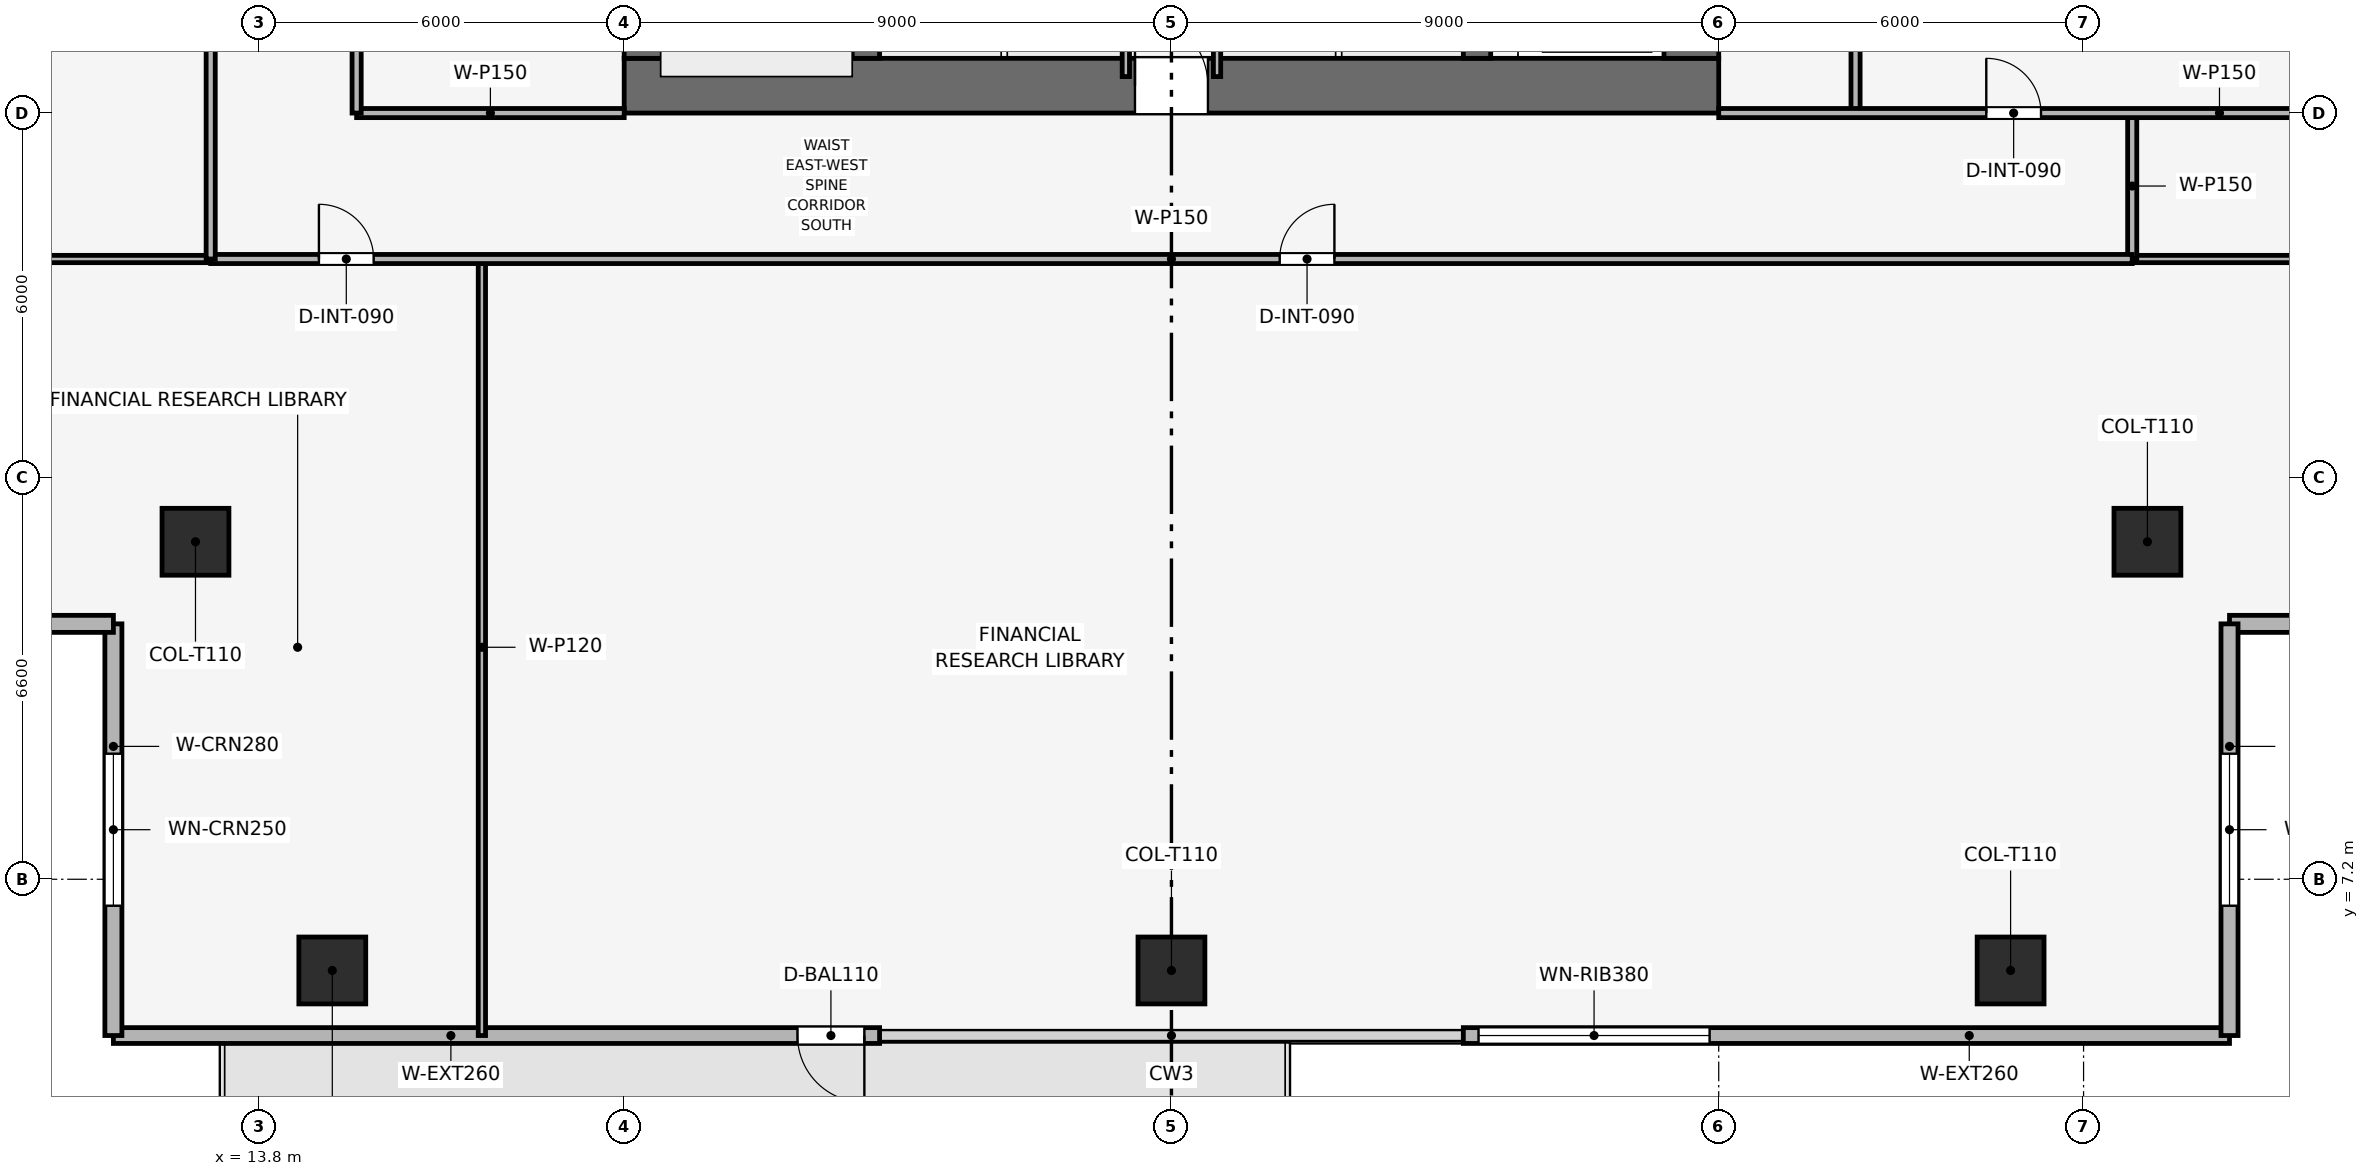
"""IFC4 building model, lengths in metres.
Left out: names, types, materials, properties, quantities, classifications, styles, units other than length and angle.
Written with IfcOpenShell. Run it as: python <this file> out.ifc"""

import sys

from ifc_helpers import new_model, si_unit, direction, frame, frame_2d, origin, origin_2d, place, context, subcontext, project, spatial, rectangle, extrude, element, fill, save


model = new_model("IFC4")
c1 = context("Model", 3, precision=1e-05, world=origin(), true_north=direction((0.0, 1.0)))
c2 = subcontext(c1, "Body", "Model", "MODEL_VIEW")
j1 = project(units=[si_unit("LENGTHUNIT", "METRE"), si_unit("PLANEANGLEUNIT", "RADIAN")], contexts=[c1])
p1 = place(None, origin())
s1 = spatial("IfcSite", under=j1, at=p1, CompositionType="ELEMENT")
p2 = place(p1, origin())
s2 = spatial("IfcBuilding", under=s1, at=p2, CompositionType="ELEMENT")
p3 = place(p2, frame((0.0, 0.0, 183.3)))
s3 = spatial("IfcBuildingStorey", under=s2, at=p3, CompositionType="ELEMENT", Elevation=183.3)
p4 = place(p3, frame((19.8, 20.25, 0.0), z_axis=(0.0, 0.0, 1.0), x_axis=(1.0, 0.0, 0.0)))
e1 = element("IfcWall", 1, at=p4, inside=s3, PredefinedType="SHEAR", context=c2, shape_type="SweptSolid", body=[
    extrude(rectangle(XDim=18.0, YDim=0.9, at=frame_2d((9.0, 0.0))), origin(), (0.0, 0.0, 1.0), 3.75),
])
p5 = place(p4, frame((8.4, 0.0, 0.0)))
e2 = element("IfcOpeningElement", 2, at=p5, cuts=e1, PredefinedType="OPENING", context=c2, shape_type="SweptSolid", body=[
    extrude(rectangle(XDim=1.2, YDim=2.2, at=frame_2d((0.6, 1.1))), frame((0.0, 0.46, 0.0), z_axis=(0.0, -1.0, 0.0), x_axis=(1.0, 0.0, 0.0)), (0.0, 0.0, 1.0), 0.92),
])
p6 = place(p3, frame((20.25, 20.7, 0.0), z_axis=(0.0, 0.0, 1.0), x_axis=(0.0, 1.0, 0.0)))
e3 = element("IfcWall", 3, at=p6, inside=s3, PredefinedType="SHEAR", context=c2, shape_type="SweptSolid", body=[
    extrude(rectangle(XDim=16.2, YDim=0.9, at=frame_2d((8.1, 0.0))), origin(), (0.0, 0.0, 1.0), 3.75),
])
p7 = place(p6, frame((10.1, 0.0, 0.0)))
e4 = element("IfcOpeningElement", 4, at=p7, cuts=e3, PredefinedType="OPENING", context=c2, shape_type="SweptSolid", body=[
    extrude(rectangle(XDim=1.1, YDim=2.15, at=frame_2d((0.55, 1.075))), frame((0.0, 0.46, 0.0), z_axis=(0.0, -1.0, 0.0), x_axis=(1.0, 0.0, 0.0)), (0.0, 0.0, 1.0), 0.92),
])
p8 = place(p3, frame((37.35, 20.7, 0.0), z_axis=(0.0, 0.0, 1.0), x_axis=(0.0, 1.0, 0.0)))
e5 = element("IfcWall", 5, at=p8, inside=s3, PredefinedType="SHEAR", context=c2, shape_type="SweptSolid", body=[
    extrude(rectangle(XDim=16.2, YDim=0.9, at=frame_2d((8.1, 0.0))), origin(), (0.0, 0.0, 1.0), 3.75),
])
p9 = place(p8, frame((4.6, 0.0, 0.0)))
e6 = element("IfcOpeningElement", 6, at=p9, cuts=e5, PredefinedType="OPENING", context=c2, shape_type="SweptSolid", body=[
    extrude(rectangle(XDim=1.1, YDim=2.15, at=frame_2d((0.55, 1.075))), frame((0.0, 0.46, 0.0), z_axis=(0.0, -1.0, 0.0), x_axis=(1.0, 0.0, 0.0)), (0.0, 0.0, 1.0), 0.92),
])
for number, where, z_axis, x_axis in (
    (7, (23.775, 20.7, 0.0), (0.0, 0.0, 1.0), (0.0, 1.0, 0.0)),
    (8, (33.825, 20.7, 0.0), (0.0, 0.0, 1.0), (0.0, 1.0, 0.0)),
):
    element("IfcWall", number, at=place(p3, frame(where, z_axis=z_axis, x_axis=x_axis)), inside=s3, PredefinedType="SHEAR", context=c2, shape_type="SweptSolid", body=[
        extrude(rectangle(XDim=16.2, YDim=0.45, at=frame_2d((8.1, 0.0))), origin(), (0.0, 0.0, 1.0), 3.75),
    ])
for number, where, z_axis, x_axis in (
    (9, (15.0, 5.7, 0.003), (0.0, 0.0, 1.0), (1.0, 0.0, 0.0)),
    (10, (28.8, 5.7, 0.003), (0.0, 0.0, 1.0), (1.0, 0.0, 0.0)),
    (11, (42.6, 5.7, 0.003), (0.0, 0.0, 1.0), (1.0, 0.0, 0.0)),
    (12, (12.75, 12.75, 0.003), (0.0, 0.0, 1.0), (1.0, 0.0, 0.0)),
    (13, (44.85, 12.75, 0.003), (0.0, 0.0, 1.0), (1.0, 0.0, 0.0)),
):
    element("IfcColumn", number, at=place(p3, frame(where, z_axis=z_axis, x_axis=x_axis)), inside=s3, PredefinedType="COLUMN", context=c2, shape_type="SweptSolid", body=[
        extrude(rectangle(XDim=1.1, YDim=1.1, at=origin_2d()), origin(), (0.0, 0.0, 1.0), 3.489),
    ])
p10 = place(p3, frame((46.2, 4.63, 0.0), z_axis=(0.0, 0.0, 1.0), x_axis=(-1.0, 0.0, 0.0)))
e14 = element("IfcWall", 14, at=p10, inside=s3, PredefinedType="SOLIDWALL", context=c2, shape_type="SweptSolid", body=[
    extrude(rectangle(XDim=12.6, YDim=0.26, at=frame_2d((6.3, 0.0))), origin(), (0.0, 0.0, 1.0), 3.495),
])
p11 = place(p10, frame((8.55, 0.0, 0.9)))
e15 = element("IfcOpeningElement", 15, at=p11, cuts=e14, PredefinedType="OPENING", context=c2, shape_type="SweptSolid", body=[
    extrude(rectangle(XDim=3.8, YDim=1.9, at=frame_2d((1.9, 0.95))), frame((0.0, 0.14, 0.0), z_axis=(0.0, -1.0, 0.0), x_axis=(1.0, 0.0, 0.0)), (0.0, 0.0, 1.0), 0.28),
])
p12 = place(p3, frame((24.0, 4.63, 0.0), z_axis=(0.0, 0.0, 1.0), x_axis=(-1.0, 0.0, 0.0)))
e16 = element("IfcWall", 16, at=p12, inside=s3, PredefinedType="SOLIDWALL", context=c2, shape_type="SweptSolid", body=[
    extrude(rectangle(XDim=12.6, YDim=0.26, at=frame_2d((6.3, 0.0))), origin(), (0.0, 0.0, 1.0), 3.495),
])
p13 = place(p12, frame((0.25, 0.0, 0.0)))
e17 = element("IfcOpeningElement", 17, at=p13, cuts=e16, PredefinedType="OPENING", context=c2, shape_type="SweptSolid", body=[
    extrude(rectangle(XDim=1.1, YDim=2.2, at=frame_2d((0.55, 1.1))), frame((0.0, 0.14, 0.0), z_axis=(0.0, -1.0, 0.0), x_axis=(1.0, 0.0, 0.0)), (0.0, 0.0, 1.0), 0.28),
])
p14 = place(p3, frame((11.4, 4.63, 0.0), z_axis=(0.0, 0.0, 1.0), x_axis=(0.0, 1.0, 0.0)))
e18 = element("IfcWall", 18, at=p14, inside=s3, PredefinedType="SOLIDWALL", context=c2, shape_type="SweptSolid", body=[
    extrude(rectangle(XDim=6.77, YDim=0.28, at=frame_2d((3.385, 0.0))), origin(), (0.0, 0.0, 1.0), 3.495),
])
p15 = place(p14, frame((2.135, 0.0, 0.9)))
e19 = element("IfcOpeningElement", 19, at=p15, cuts=e18, PredefinedType="OPENING", context=c2, shape_type="SweptSolid", body=[
    extrude(rectangle(XDim=2.5, YDim=1.9, at=frame_2d((1.25, 0.95))), frame((0.0, 0.15, 0.0), z_axis=(0.0, -1.0, 0.0), x_axis=(1.0, 0.0, 0.0)), (0.0, 0.0, 1.0), 0.3),
])
p16 = place(p3, frame((11.4, 11.4, 0.0), z_axis=(0.0, 0.0, 1.0), x_axis=(-1.0, 0.0, 0.0)))
e20 = element("IfcWall", 20, at=p16, inside=s3, PredefinedType="SOLIDWALL", context=c2, shape_type="SweptSolid", body=[
    extrude(rectangle(XDim=6.77, YDim=0.28, at=frame_2d((3.385, 0.0))), origin(), (0.0, 0.0, 1.0), 3.495),
])
p17 = place(p16, frame((2.135, 0.0, 0.9)))
e21 = element("IfcOpeningElement", 21, at=p17, cuts=e20, PredefinedType="OPENING", context=c2, shape_type="SweptSolid", body=[
    extrude(rectangle(XDim=2.5, YDim=1.9, at=frame_2d((1.25, 0.95))), frame((0.0, 0.15, 0.0), z_axis=(0.0, -1.0, 0.0), x_axis=(1.0, 0.0, 0.0)), (0.0, 0.0, 1.0), 0.3),
])
p18 = place(p3, frame((52.97, 11.4, 0.0), z_axis=(0.0, 0.0, 1.0), x_axis=(-1.0, 0.0, 0.0)))
e22 = element("IfcWall", 22, at=p18, inside=s3, PredefinedType="SOLIDWALL", context=c2, shape_type="SweptSolid", body=[
    extrude(rectangle(XDim=6.77, YDim=0.28, at=frame_2d((3.385, 0.0))), origin(), (0.0, 0.0, 1.0), 3.495),
])
p19 = place(p18, frame((2.135, 0.0, 0.9)))
e23 = element("IfcOpeningElement", 23, at=p19, cuts=e22, PredefinedType="OPENING", context=c2, shape_type="SweptSolid", body=[
    extrude(rectangle(XDim=2.5, YDim=1.9, at=frame_2d((1.25, 0.95))), frame((0.0, 0.15, 0.0), z_axis=(0.0, -1.0, 0.0), x_axis=(1.0, 0.0, 0.0)), (0.0, 0.0, 1.0), 0.3),
])
p20 = place(p3, frame((46.2, 11.4, 0.0), z_axis=(0.0, 0.0, 1.0), x_axis=(0.0, -1.0, 0.0)))
e24 = element("IfcWall", 24, at=p20, inside=s3, PredefinedType="SOLIDWALL", context=c2, shape_type="SweptSolid", body=[
    extrude(rectangle(XDim=6.77, YDim=0.28, at=frame_2d((3.385, 0.0))), origin(), (0.0, 0.0, 1.0), 3.495),
])
p21 = place(p20, frame((2.135, 0.0, 0.9)))
e25 = element("IfcOpeningElement", 25, at=p21, cuts=e24, PredefinedType="OPENING", context=c2, shape_type="SweptSolid", body=[
    extrude(rectangle(XDim=2.5, YDim=1.9, at=frame_2d((1.25, 0.95))), frame((0.0, 0.15, 0.0), z_axis=(0.0, -1.0, 0.0), x_axis=(1.0, 0.0, 0.0)), (0.0, 0.0, 1.0), 0.3),
])
for number, where, z_axis, x_axis in (
    (26, (28.05, 20.4, 0.0), (0.0, 0.0, 1.0), (0.0, 1.0, 0.0)),
    (27, (29.55, 20.4, 0.0), (0.0, 0.0, 1.0), (0.0, 1.0, 0.0)),
):
    element("IfcWall", number, at=place(p3, frame(where, z_axis=z_axis, x_axis=x_axis)), inside=s3, PredefinedType="PARTITIONING", context=c2, shape_type="SweptSolid", body=[
        extrude(rectangle(XDim=2.75, YDim=0.12, at=frame_2d((1.375, 0.0))), origin(), (0.0, 0.0, 1.0), 3.495),
    ])
p22 = place(p3, frame((15.4, 19.8, 0.0), z_axis=(0.0, 0.0, 1.0), x_axis=(1.0, 0.0, 0.0)))
e28 = element("IfcWall", 28, at=p22, inside=s3, PredefinedType="PARTITIONING", context=c2, shape_type="SweptSolid", body=[
    extrude(rectangle(XDim=4.4, YDim=0.15, at=frame_2d((2.2, 0.0))), origin(), (0.0, 0.0, 1.0), 3.03),
])
p23 = place(p3, frame((15.4, 19.8, 0.0), z_axis=(0.0, 0.0, 1.0), x_axis=(0.0, 1.0, 0.0)))
e29 = element("IfcWall", 29, at=p23, inside=s3, PredefinedType="PARTITIONING", context=c2, shape_type="SweptSolid", body=[
    extrude(rectangle(XDim=10.35, YDim=0.15, at=frame_2d((5.175, 0.0))), origin(), (0.0, 0.0, 1.0), 3.03),
])
p24 = place(p23, frame((1.2, 0.0, 0.0)))
e30 = element("IfcOpeningElement", 30, at=p24, cuts=e29, PredefinedType="OPENING", context=c2, shape_type="SweptSolid", body=[
    extrude(rectangle(XDim=0.9, YDim=2.1, at=frame_2d((0.45, 1.05))), frame((0.0, 0.085, 0.0), z_axis=(0.0, -1.0, 0.0), x_axis=(1.0, 0.0, 0.0)), (0.0, 0.0, 1.0), 0.17),
])
p25 = place(p23, frame((4.7, 0.0, 0.0)))
e31 = element("IfcOpeningElement", 31, at=p25, cuts=e29, PredefinedType="OPENING", context=c2, shape_type="SweptSolid", body=[
    extrude(rectangle(XDim=0.9, YDim=2.1, at=frame_2d((0.45, 1.05))), frame((0.0, 0.085, 0.0), z_axis=(0.0, -1.0, 0.0), x_axis=(1.0, 0.0, 0.0)), (0.0, 0.0, 1.0), 0.17),
])
p26 = place(p23, frame((8.1, 0.0, 0.0)))
e32 = element("IfcOpeningElement", 32, at=p26, cuts=e29, PredefinedType="OPENING", context=c2, shape_type="SweptSolid", body=[
    extrude(rectangle(XDim=0.95, YDim=2.1, at=frame_2d((0.475, 1.05))), frame((0.0, 0.085, 0.0), z_axis=(0.0, -1.0, 0.0), x_axis=(1.0, 0.0, 0.0)), (0.0, 0.0, 1.0), 0.17),
])
p27 = place(p3, frame((40.05, 19.8, 0.0), z_axis=(0.0, 0.0, 1.0), x_axis=(0.0, 1.0, 0.0)))
e33 = element("IfcWall", 33, at=p27, inside=s3, PredefinedType="PARTITIONING", context=c2, shape_type="SweptSolid", body=[
    extrude(rectangle(XDim=7.05, YDim=0.15, at=frame_2d((3.525, 0.0))), origin(), (0.0, 0.0, 1.0), 3.03),
])
p28 = place(p3, frame((17.46, 4.63, 0.0), z_axis=(0.0, 0.0, 1.0), x_axis=(0.0, 1.0, 0.0)))
e34 = element("IfcWall", 34, at=p28, inside=s3, PredefinedType="PARTITIONING", context=c2, shape_type="SweptSolid", body=[
    extrude(rectangle(XDim=12.77, YDim=0.12, at=frame_2d((6.385, 0.0))), origin(), (0.0, 0.0, 1.0), 2.98),
])
p29 = place(p3, frame((4.63, 17.4, 0.0), z_axis=(0.0, 0.0, 1.0), x_axis=(1.0, 0.0, 0.0)))
e35 = element("IfcWall", 35, at=p29, inside=s3, PredefinedType="PARTITIONING", context=c2, shape_type="SweptSolid", body=[
    extrude(rectangle(XDim=8.37, YDim=0.12, at=frame_2d((4.185, 0.0))), origin(), (0.0, 0.0, 1.0), 2.98),
])
p30 = place(p3, frame((44.6, 17.4, 0.0), z_axis=(0.0, 0.0, 1.0), x_axis=(1.0, 0.0, 0.0)))
e36 = element("IfcWall", 36, at=p30, inside=s3, PredefinedType="PARTITIONING", context=c2, shape_type="SweptSolid", body=[
    extrude(rectangle(XDim=8.37, YDim=0.12, at=frame_2d((4.185, 0.0))), origin(), (0.0, 0.0, 1.0), 2.98),
])
p31 = place(p3, frame((44.6, 17.4, 0.0), z_axis=(0.0, 0.0, 1.0), x_axis=(0.0, 1.0, 0.0)))
e37 = element("IfcWall", 37, at=p31, inside=s3, PredefinedType="PARTITIONING", context=c2, shape_type="SweptSolid", body=[
    extrude(rectangle(XDim=2.4, YDim=0.15, at=frame_2d((1.2, 0.0))), origin(), (0.0, 0.0, 1.0), 3.495),
])
p32 = place(p3, frame((37.8, 19.8, 0.0), z_axis=(0.0, 0.0, 1.0), x_axis=(1.0, 0.0, 0.0)))
e38 = element("IfcWall", 38, at=p32, inside=s3, PredefinedType="PARTITIONING", context=c2, shape_type="SweptSolid", body=[
    extrude(rectangle(XDim=15.17, YDim=0.15, at=frame_2d((7.585, 0.0))), origin(), (0.0, 0.0, 1.0), 2.98),
])
p33 = place(p32, frame((4.4, 0.0, 0.0)))
e39 = element("IfcOpeningElement", 39, at=p33, cuts=e38, PredefinedType="OPENING", context=c2, shape_type="SweptSolid", body=[
    extrude(rectangle(XDim=0.9, YDim=2.1, at=frame_2d((0.45, 1.05))), frame((0.0, 0.085, 0.0), z_axis=(0.0, -1.0, 0.0), x_axis=(1.0, 0.0, 0.0)), (0.0, 0.0, 1.0), 0.17),
])
p34 = place(p3, frame((13.0, 17.4, 0.0), z_axis=(0.0, 0.0, 1.0), x_axis=(1.0, 0.0, 0.0)))
e40 = element("IfcWall", 40, at=p34, inside=s3, PredefinedType="PARTITIONING", context=c2, shape_type="SweptSolid", body=[
    extrude(rectangle(XDim=31.6, YDim=0.15, at=frame_2d((15.8, 0.0))), origin(), (0.0, 0.0, 1.0), 3.03),
])
p35 = place(p34, frame((1.78, 0.0, 0.0)))
e41 = element("IfcOpeningElement", 41, at=p35, cuts=e40, PredefinedType="OPENING", context=c2, shape_type="SweptSolid", body=[
    extrude(rectangle(XDim=0.9, YDim=2.1, at=frame_2d((0.45, 1.05))), frame((0.0, 0.085, 0.0), z_axis=(0.0, -1.0, 0.0), x_axis=(1.0, 0.0, 0.0)), (0.0, 0.0, 1.0), 0.17),
])
p36 = place(p34, frame((17.58, 0.0, 0.0)))
e42 = element("IfcOpeningElement", 42, at=p36, cuts=e40, PredefinedType="OPENING", context=c2, shape_type="SweptSolid", body=[
    extrude(rectangle(XDim=0.9, YDim=2.1, at=frame_2d((0.45, 1.05))), frame((0.0, 0.085, 0.0), z_axis=(0.0, -1.0, 0.0), x_axis=(1.0, 0.0, 0.0)), (0.0, 0.0, 1.0), 0.17),
])
p37 = place(p3, frame((13.0, 17.4, 0.0), z_axis=(0.0, 0.0, 1.0), x_axis=(0.0, 1.0, 0.0)))
e43 = element("IfcWall", 43, at=p37, inside=s3, PredefinedType="PARTITIONING", context=c2, shape_type="SweptSolid", body=[
    extrude(rectangle(XDim=22.8, YDim=0.15, at=frame_2d((11.4, 0.0))), origin(), (0.0, 0.0, 1.0), 3.03),
])
p38 = place(p37, frame((6.115, 0.0, 0.0)))
e44 = element("IfcOpeningElement", 44, at=p38, cuts=e43, PredefinedType="OPENING", context=c2, shape_type="SweptSolid", body=[
    extrude(rectangle(XDim=0.9, YDim=2.1, at=frame_2d((0.45, 1.05))), frame((0.0, 0.085, 0.0), z_axis=(0.0, -1.0, 0.0), x_axis=(1.0, 0.0, 0.0)), (0.0, 0.0, 1.0), 0.17),
])
p39 = place(p37, frame((15.115, 0.0, 0.0)))
e45 = element("IfcOpeningElement", 45, at=p39, cuts=e43, PredefinedType="OPENING", context=c2, shape_type="SweptSolid", body=[
    extrude(rectangle(XDim=0.9, YDim=2.1, at=frame_2d((0.45, 1.05))), frame((0.0, 0.085, 0.0), z_axis=(0.0, -1.0, 0.0), x_axis=(1.0, 0.0, 0.0)), (0.0, 0.0, 1.0), 0.17),
])
p40 = place(p13, origin())
e46 = element("IfcDoor", 46, at=p40, inside=s3, OperationType="SINGLE_SWING_LEFT", PredefinedType="DOOR", context=c2, shape_type="SweptSolid", body=[
    extrude(rectangle(XDim=1.1, YDim=2.2, at=frame_2d((0.55, 1.1))), frame((0.0, 0.025, 0.0), z_axis=(0.0, -1.0, 0.0), x_axis=(1.0, 0.0, 0.0)), (0.0, 0.0, 1.0), 0.05),
])
fill(e17, e46)
p41 = place(p11, origin())
e47 = element("IfcWindow", 47, at=p41, inside=s3, PartitioningType="SINGLE_PANEL", PredefinedType="WINDOW", context=c2, shape_type="SweptSolid", body=[
    extrude(rectangle(XDim=3.8, YDim=1.9, at=frame_2d((1.9, 0.95))), frame((0.0, 0.03, 0.0), z_axis=(0.0, -1.0, 0.0), x_axis=(1.0, 0.0, 0.0)), (0.0, 0.0, 1.0), 0.06),
])
fill(e15, e47)
p42 = place(p15, origin())
e48 = element("IfcWindow", 48, at=p42, inside=s3, PartitioningType="SINGLE_PANEL", PredefinedType="WINDOW", context=c2, shape_type="SweptSolid", body=[
    extrude(rectangle(XDim=2.5, YDim=1.9, at=frame_2d((1.25, 0.95))), frame((0.0, 0.03, 0.0), z_axis=(0.0, -1.0, 0.0), x_axis=(1.0, 0.0, 0.0)), (0.0, 0.0, 1.0), 0.06),
])
fill(e19, e48)
p43 = place(p21, origin())
e49 = element("IfcWindow", 49, at=p43, inside=s3, PartitioningType="SINGLE_PANEL", PredefinedType="WINDOW", context=c2, shape_type="SweptSolid", body=[
    extrude(rectangle(XDim=2.5, YDim=1.9, at=frame_2d((1.25, 0.95))), frame((0.0, 0.03, 0.0), z_axis=(0.0, -1.0, 0.0), x_axis=(1.0, 0.0, 0.0)), (0.0, 0.0, 1.0), 0.06),
])
fill(e25, e49)
p44 = place(p33, origin())
e50 = element("IfcDoor", 50, at=p44, inside=s3, OperationType="SINGLE_SWING_LEFT", PredefinedType="DOOR", context=c2, shape_type="SweptSolid", body=[
    extrude(rectangle(XDim=0.9, YDim=2.1, at=frame_2d((0.45, 1.05))), frame((0.0, 0.025, 0.0), z_axis=(0.0, -1.0, 0.0), x_axis=(1.0, 0.0, 0.0)), (0.0, 0.0, 1.0), 0.05),
])
fill(e39, e50)
p45 = place(p35, origin())
e51 = element("IfcDoor", 51, at=p45, inside=s3, OperationType="SINGLE_SWING_LEFT", PredefinedType="DOOR", context=c2, shape_type="SweptSolid", body=[
    extrude(rectangle(XDim=0.9, YDim=2.1, at=frame_2d((0.45, 1.05))), frame((0.0, 0.025, 0.0), z_axis=(0.0, -1.0, 0.0), x_axis=(1.0, 0.0, 0.0)), (0.0, 0.0, 1.0), 0.05),
])
fill(e41, e51)
p46 = place(p36, origin())
e52 = element("IfcDoor", 52, at=p46, inside=s3, OperationType="SINGLE_SWING_RIGHT", PredefinedType="DOOR", context=c2, shape_type="SweptSolid", body=[
    extrude(rectangle(XDim=0.9, YDim=2.1, at=frame_2d((0.45, 1.05))), frame((0.0, 0.025, 0.0), z_axis=(0.0, -1.0, 0.0), x_axis=(1.0, 0.0, 0.0)), (0.0, 0.0, 1.0), 0.05),
])
fill(e42, e52)
p47 = place(p5, origin())
e53 = element("IfcDoor", 53, at=p47, inside=s3, OperationType="SINGLE_SWING_LEFT", PredefinedType="DOOR", context=c2, shape_type="SweptSolid", body=[
    extrude(rectangle(XDim=1.2, YDim=2.2, at=frame_2d((0.6, 1.1))), frame((0.0, 0.025, 0.0), z_axis=(0.0, -1.0, 0.0), x_axis=(1.0, 0.0, 0.0)), (0.0, 0.0, 1.0), 0.05),
])
fill(e2, e53)
save(model, sys.argv[1])
